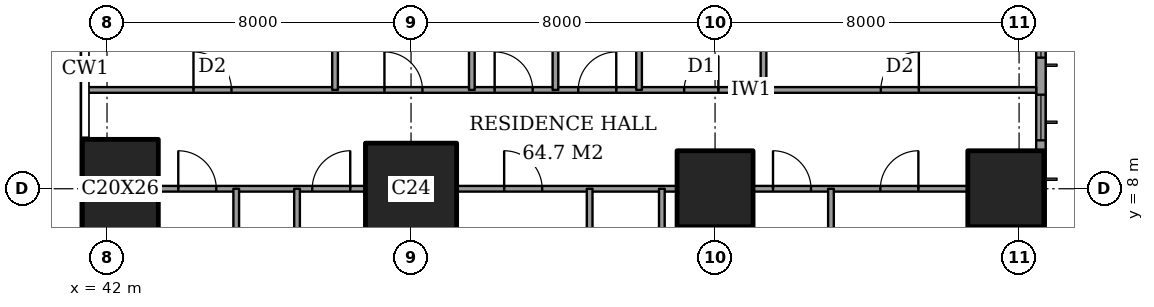
"""IFC4 building model, lengths in metres.
Left out: names, types, materials, properties, quantities, classifications, styles, units other than length and angle.
Written with IfcOpenShell. Run it as: python <this file> out.ifc"""

import sys

from ifc_helpers import new_model, si_unit, direction, frame, frame_2d, origin, origin_2d, place, context, subcontext, project, spatial, rectangle, extrude, element, fill, save


model = new_model("IFC4")
c1 = context("Model", 3, precision=1e-05, world=origin(), true_north=direction((0.0, 1.0)))
c2 = subcontext(c1, "Body", "Model", "MODEL_VIEW")
j1 = project(units=[si_unit("LENGTHUNIT", "METRE"), si_unit("PLANEANGLEUNIT", "RADIAN")], contexts=[c1])
p1 = place(None, origin())
s1 = spatial("IfcSite", under=j1, at=p1, CompositionType="ELEMENT")
p2 = place(p1, origin())
s2 = spatial("IfcBuilding", under=s1, at=p2, CompositionType="ELEMENT")
p3 = place(p2, frame((0.0, 0.0, 87.2)))
s3 = spatial("IfcBuildingStorey", under=s2, at=p3, CompositionType="ELEMENT", Elevation=87.2)
p4 = place(p3, frame((42.35, 8.0, 0.0), z_axis=(0.0, 0.0, 1.0), x_axis=(1.0, 0.0, 0.0)))
e1 = element("IfcColumn", 1, at=p4, inside=s3, PredefinedType="COLUMN", context=c2, shape_type="SweptSolid", body=[
    extrude(rectangle(XDim=2.0, YDim=2.6, at=origin_2d()), origin(), (0.0, 0.0, 1.0), 3.6),
])
p5 = place(p3, frame((50.0, 8.0, 0.0), z_axis=(0.0, 0.0, 1.0), x_axis=(1.0, 0.0, 0.0)))
e2 = element("IfcColumn", 2, at=p5, inside=s3, PredefinedType="COLUMN", context=c2, shape_type="SweptSolid", body=[
    extrude(rectangle(XDim=2.4, YDim=2.4, at=origin_2d()), origin(), (0.0, 0.0, 1.0), 3.6),
])
for number, where, z_axis, x_axis in (
    (3, (58.0, 8.0, 0.0), (0.0, 0.0, 1.0), (1.0, 0.0, 0.0)),
    (4, (65.65, 8.0, 0.0), (0.0, 0.0, 1.0), (1.0, 0.0, 0.0)),
):
    element("IfcColumn", number, at=place(p3, frame(where, z_axis=z_axis, x_axis=x_axis)), inside=s3, PredefinedType="COLUMN", context=c2, shape_type="SweptSolid", body=[
        extrude(rectangle(XDim=2.0, YDim=2.0, at=origin_2d()), origin(), (0.0, 0.0, 1.0), 3.6),
    ])
p6 = place(p3, frame((66.575, 3.175, 0.0), z_axis=(0.0, 0.0, 1.0), x_axis=(0.0, 1.0, 0.0)))
e5 = element("IfcWall", 5, at=p6, inside=s3, PredefinedType="SOLIDWALL", context=c2, shape_type="SweptSolid", body=[
    extrude(rectangle(XDim=41.65, YDim=0.25, at=frame_2d((20.825, 0.0))), origin(), (0.0, 0.0, 1.0), 3.6),
])
p7 = place(p6, frame((0.775, 0.0, 0.6)))
e6 = element("IfcOpeningElement", 6, at=p7, cuts=e5, PredefinedType="OPENING", context=c2, shape_type="SweptSolid", body=[
    extrude(rectangle(XDim=2.4, YDim=2.0, at=frame_2d((1.2, 1.0))), frame((0.0, 0.135, 0.0), z_axis=(0.0, -1.0, 0.0), x_axis=(1.0, 0.0, 0.0)), (0.0, 0.0, 1.0), 0.27),
])
p8 = place(p6, frame((6.1, 0.0, 0.6)))
e7 = element("IfcOpeningElement", 7, at=p8, cuts=e5, PredefinedType="OPENING", context=c2, shape_type="SweptSolid", body=[
    extrude(rectangle(XDim=1.2, YDim=2.0, at=frame_2d((0.6, 1.0))), frame((0.0, 0.135, 0.0), z_axis=(0.0, -1.0, 0.0), x_axis=(1.0, 0.0, 0.0)), (0.0, 0.0, 1.0), 0.27),
])
p9 = place(p6, frame((8.275, 0.0, 0.6)))
e8 = element("IfcOpeningElement", 8, at=p9, cuts=e5, PredefinedType="OPENING", context=c2, shape_type="SweptSolid", body=[
    extrude(rectangle(XDim=2.4, YDim=2.0, at=frame_2d((1.2, 1.0))), frame((0.0, 0.135, 0.0), z_axis=(0.0, -1.0, 0.0), x_axis=(1.0, 0.0, 0.0)), (0.0, 0.0, 1.0), 0.27),
])
p10 = place(p6, frame((15.775, 0.0, 0.6)))
e9 = element("IfcOpeningElement", 9, at=p10, cuts=e5, PredefinedType="OPENING", context=c2, shape_type="SweptSolid", body=[
    extrude(rectangle(XDim=2.4, YDim=2.0, at=frame_2d((1.2, 1.0))), frame((0.0, 0.135, 0.0), z_axis=(0.0, -1.0, 0.0), x_axis=(1.0, 0.0, 0.0)), (0.0, 0.0, 1.0), 0.27),
])
p11 = place(p6, frame((23.475, 0.0, 0.6)))
e10 = element("IfcOpeningElement", 10, at=p11, cuts=e5, PredefinedType="OPENING", context=c2, shape_type="SweptSolid", body=[
    extrude(rectangle(XDim=2.4, YDim=2.0, at=frame_2d((1.2, 1.0))), frame((0.0, 0.135, 0.0), z_axis=(0.0, -1.0, 0.0), x_axis=(1.0, 0.0, 0.0)), (0.0, 0.0, 1.0), 0.27),
])
p12 = place(p6, frame((30.975, 0.0, 0.6)))
e11 = element("IfcOpeningElement", 11, at=p12, cuts=e5, PredefinedType="OPENING", context=c2, shape_type="SweptSolid", body=[
    extrude(rectangle(XDim=2.4, YDim=2.0, at=frame_2d((1.2, 1.0))), frame((0.0, 0.135, 0.0), z_axis=(0.0, -1.0, 0.0), x_axis=(1.0, 0.0, 0.0)), (0.0, 0.0, 1.0), 0.27),
])
p13 = place(p6, frame((34.5, 0.0, 0.6)))
e12 = element("IfcOpeningElement", 12, at=p13, cuts=e5, PredefinedType="OPENING", context=c2, shape_type="SweptSolid", body=[
    extrude(rectangle(XDim=1.2, YDim=2.0, at=frame_2d((0.6, 1.0))), frame((0.0, 0.135, 0.0), z_axis=(0.0, -1.0, 0.0), x_axis=(1.0, 0.0, 0.0)), (0.0, 0.0, 1.0), 0.27),
])
p14 = place(p6, frame((38.475, 0.0, 0.6)))
e13 = element("IfcOpeningElement", 13, at=p14, cuts=e5, PredefinedType="OPENING", context=c2, shape_type="SweptSolid", body=[
    extrude(rectangle(XDim=2.4, YDim=2.0, at=frame_2d((1.2, 1.0))), frame((0.0, 0.135, 0.0), z_axis=(0.0, -1.0, 0.0), x_axis=(1.0, 0.0, 0.0)), (0.0, 0.0, 1.0), 0.27),
])
p15 = place(p3, frame((43.35, 8.0, 0.0), z_axis=(0.0, 0.0, 1.0), x_axis=(1.0, 0.0, 0.0)))
e14 = element("IfcWall", 14, at=p15, inside=s3, PredefinedType="PARTITIONING", context=c2, shape_type="SweptSolid", body=[
    extrude(rectangle(XDim=5.45, YDim=0.15, at=frame_2d((2.725, 0.0))), origin(), (0.0, 0.0, 1.0), 3.25),
])
p16 = place(p15, frame((4.05, 0.0, 0.0)))
e15 = element("IfcOpeningElement", 15, at=p16, cuts=e14, PredefinedType="OPENING", context=c2, shape_type="SweptSolid", body=[
    extrude(rectangle(XDim=1.0, YDim=2.1, at=frame_2d((0.5, 1.05))), frame((0.0, 0.085, 0.0), z_axis=(0.0, -1.0, 0.0), x_axis=(1.0, 0.0, 0.0)), (0.0, 0.0, 1.0), 0.17),
])
p17 = place(p15, frame((0.525, 0.0, 0.0)))
e16 = element("IfcOpeningElement", 16, at=p17, cuts=e14, PredefinedType="OPENING", context=c2, shape_type="SweptSolid", body=[
    extrude(rectangle(XDim=1.0, YDim=2.1, at=frame_2d((0.5, 1.05))), frame((0.0, 0.085, 0.0), z_axis=(0.0, -1.0, 0.0), x_axis=(1.0, 0.0, 0.0)), (0.0, 0.0, 1.0), 0.17),
])
p18 = place(p3, frame((51.2, 8.0, 0.0), z_axis=(0.0, 0.0, 1.0), x_axis=(1.0, 0.0, 0.0)))
e17 = element("IfcWall", 17, at=p18, inside=s3, PredefinedType="PARTITIONING", context=c2, shape_type="SweptSolid", body=[
    extrude(rectangle(XDim=5.8, YDim=0.15, at=frame_2d((2.9, 0.0))), origin(), (0.0, 0.0, 1.0), 3.25),
])
p19 = place(p18, frame((1.25, 0.0, 0.0)))
e18 = element("IfcOpeningElement", 18, at=p19, cuts=e17, PredefinedType="OPENING", context=c2, shape_type="SweptSolid", body=[
    extrude(rectangle(XDim=1.0, YDim=2.1, at=frame_2d((0.5, 1.05))), frame((0.0, 0.085, 0.0), z_axis=(0.0, -1.0, 0.0), x_axis=(1.0, 0.0, 0.0)), (0.0, 0.0, 1.0), 0.17),
])
p20 = place(p3, frame((59.0, 8.0, 0.0), z_axis=(0.0, 0.0, 1.0), x_axis=(1.0, 0.0, 0.0)))
e19 = element("IfcWall", 19, at=p20, inside=s3, PredefinedType="PARTITIONING", context=c2, shape_type="SweptSolid", body=[
    extrude(rectangle(XDim=5.65, YDim=0.15, at=frame_2d((2.825, 0.0))), origin(), (0.0, 0.0, 1.0), 3.25),
])
p21 = place(p20, frame((3.35, 0.0, 0.0)))
e20 = element("IfcOpeningElement", 20, at=p21, cuts=e19, PredefinedType="OPENING", context=c2, shape_type="SweptSolid", body=[
    extrude(rectangle(XDim=1.0, YDim=2.1, at=frame_2d((0.5, 1.05))), frame((0.0, 0.085, 0.0), z_axis=(0.0, -1.0, 0.0), x_axis=(1.0, 0.0, 0.0)), (0.0, 0.0, 1.0), 0.17),
])
p22 = place(p20, frame((0.525, 0.0, 0.0)))
e21 = element("IfcOpeningElement", 21, at=p22, cuts=e19, PredefinedType="OPENING", context=c2, shape_type="SweptSolid", body=[
    extrude(rectangle(XDim=1.0, YDim=2.1, at=frame_2d((0.5, 1.05))), frame((0.0, 0.085, 0.0), z_axis=(0.0, -1.0, 0.0), x_axis=(1.0, 0.0, 0.0)), (0.0, 0.0, 1.0), 0.17),
])
p23 = place(p3, frame((41.439, 10.6, 0.0), z_axis=(0.0, 0.0, 1.0), x_axis=(1.0, 0.0, 0.0)))
e22 = element("IfcWall", 22, at=p23, inside=s3, PredefinedType="PARTITIONING", context=c2, shape_type="SweptSolid", body=[
    extrude(rectangle(XDim=25.011, YDim=0.15, at=frame_2d((12.505, 0.0))), origin(), (0.0, 0.0, 1.0), 3.25),
])
p24 = place(p23, frame((10.761, 0.0, 0.0)))
e23 = element("IfcOpeningElement", 23, at=p24, cuts=e22, PredefinedType="OPENING", context=c2, shape_type="SweptSolid", body=[
    extrude(rectangle(XDim=1.0, YDim=2.1, at=frame_2d((0.5, 1.05))), frame((0.0, 0.085, 0.0), z_axis=(0.0, -1.0, 0.0), x_axis=(1.0, 0.0, 0.0)), (0.0, 0.0, 1.0), 0.17),
])
p25 = place(p23, frame((20.924, 0.0, 0.0)))
e24 = element("IfcOpeningElement", 24, at=p25, cuts=e22, PredefinedType="OPENING", context=c2, shape_type="SweptSolid", body=[
    extrude(rectangle(XDim=1.0, YDim=2.1, at=frame_2d((0.5, 1.05))), frame((0.0, 0.085, 0.0), z_axis=(0.0, -1.0, 0.0), x_axis=(1.0, 0.0, 0.0)), (0.0, 0.0, 1.0), 0.17),
])
p26 = place(p23, frame((15.749, 0.0, 0.0)))
e25 = element("IfcOpeningElement", 25, at=p26, cuts=e22, PredefinedType="OPENING", context=c2, shape_type="SweptSolid", body=[
    extrude(rectangle(XDim=0.9, YDim=2.1, at=frame_2d((0.45, 1.05))), frame((0.0, 0.085, 0.0), z_axis=(0.0, -1.0, 0.0), x_axis=(1.0, 0.0, 0.0)), (0.0, 0.0, 1.0), 0.17),
])
p27 = place(p23, frame((12.961, 0.0, 0.0)))
e26 = element("IfcOpeningElement", 26, at=p27, cuts=e22, PredefinedType="OPENING", context=c2, shape_type="SweptSolid", body=[
    extrude(rectangle(XDim=1.0, YDim=2.1, at=frame_2d((0.5, 1.05))), frame((0.0, 0.085, 0.0), z_axis=(0.0, -1.0, 0.0), x_axis=(1.0, 0.0, 0.0)), (0.0, 0.0, 1.0), 0.17),
])
p28 = place(p23, frame((7.861, 0.0, 0.0)))
e27 = element("IfcOpeningElement", 27, at=p28, cuts=e22, PredefinedType="OPENING", context=c2, shape_type="SweptSolid", body=[
    extrude(rectangle(XDim=1.0, YDim=2.1, at=frame_2d((0.5, 1.05))), frame((0.0, 0.085, 0.0), z_axis=(0.0, -1.0, 0.0), x_axis=(1.0, 0.0, 0.0)), (0.0, 0.0, 1.0), 0.17),
])
p29 = place(p23, frame((2.836, 0.0, 0.0)))
e28 = element("IfcOpeningElement", 28, at=p29, cuts=e22, PredefinedType="OPENING", context=c2, shape_type="SweptSolid", body=[
    extrude(rectangle(XDim=1.0, YDim=2.1, at=frame_2d((0.5, 1.05))), frame((0.0, 0.085, 0.0), z_axis=(0.0, -1.0, 0.0), x_axis=(1.0, 0.0, 0.0)), (0.0, 0.0, 1.0), 0.17),
])
p30 = place(p3, frame((45.4, -0.45, 0.0), z_axis=(0.0, 0.0, 1.0), x_axis=(0.0, 1.0, 0.0)))
e29 = element("IfcWall", 29, at=p30, inside=s3, PredefinedType="PARTITIONING", context=c2, shape_type="SweptSolid", body=[
    extrude(rectangle(XDim=8.45, YDim=0.15, at=frame_2d((4.225, 0.0))), origin(), (0.0, 0.0, 1.0), 3.25),
])
p31 = place(p30, frame((3.775, 0.0, 0.0)))
e30 = element("IfcOpeningElement", 30, at=p31, cuts=e29, PredefinedType="OPENING", context=c2, shape_type="SweptSolid", body=[
    extrude(rectangle(XDim=0.9, YDim=2.1, at=frame_2d((0.45, 1.05))), frame((0.0, 0.085, 0.0), z_axis=(0.0, -1.0, 0.0), x_axis=(1.0, 0.0, 0.0)), (0.0, 0.0, 1.0), 0.17),
])
p32 = place(p3, frame((47.0, -0.45, 0.0), z_axis=(0.0, 0.0, 1.0), x_axis=(0.0, 1.0, 0.0)))
e31 = element("IfcWall", 31, at=p32, inside=s3, PredefinedType="PARTITIONING", context=c2, shape_type="SweptSolid", body=[
    extrude(rectangle(XDim=8.45, YDim=0.15, at=frame_2d((4.225, 0.0))), origin(), (0.0, 0.0, 1.0), 3.25),
])
for number, where, z_axis, x_axis in (
    (32, (48.0, 10.6, 0.0), (0.0, 0.0, 1.0), (0.0, 1.0, 0.0)),
    (33, (51.6, 10.6, 0.0), (0.0, 0.0, 1.0), (0.0, 1.0, 0.0)),
    (34, (53.8, 10.6, 0.0), (0.0, 0.0, 1.0), (0.0, 1.0, 0.0)),
):
    element("IfcWall", number, at=place(p3, frame(where, z_axis=z_axis, x_axis=x_axis)), inside=s3, PredefinedType="PARTITIONING", context=c2, shape_type="SweptSolid", body=[
        extrude(rectangle(XDim=6.4, YDim=0.15, at=frame_2d((3.2, 0.0))), origin(), (0.0, 0.0, 1.0), 3.25),
    ])
p33 = place(p3, frame((54.7, -0.45, 0.0), z_axis=(0.0, 0.0, 1.0), x_axis=(0.0, 1.0, 0.0)))
e35 = element("IfcWall", 35, at=p33, inside=s3, PredefinedType="PARTITIONING", context=c2, shape_type="SweptSolid", body=[
    extrude(rectangle(XDim=8.45, YDim=0.15, at=frame_2d((4.225, 0.0))), origin(), (0.0, 0.0, 1.0), 3.25),
])
p34 = place(p33, frame((3.775, 0.0, 0.0)))
e36 = element("IfcOpeningElement", 36, at=p34, cuts=e35, PredefinedType="OPENING", context=c2, shape_type="SweptSolid", body=[
    extrude(rectangle(XDim=0.9, YDim=2.1, at=frame_2d((0.45, 1.05))), frame((0.0, 0.085, 0.0), z_axis=(0.0, -1.0, 0.0), x_axis=(1.0, 0.0, 0.0)), (0.0, 0.0, 1.0), 0.17),
])
p35 = place(p3, frame((56.0, 10.6, 0.0), z_axis=(0.0, 0.0, 1.0), x_axis=(0.0, 1.0, 0.0)))
e37 = element("IfcWall", 37, at=p35, inside=s3, PredefinedType="PARTITIONING", context=c2, shape_type="SweptSolid", body=[
    extrude(rectangle(XDim=11.0, YDim=0.15, at=frame_2d((5.5, 0.0))), origin(), (0.0, 0.0, 1.0), 3.25),
])
p36 = place(p35, frame((8.2, 0.0, 0.0)))
e38 = element("IfcOpeningElement", 38, at=p36, cuts=e37, PredefinedType="OPENING", context=c2, shape_type="SweptSolid", body=[
    extrude(rectangle(XDim=1.0, YDim=2.1, at=frame_2d((0.5, 1.05))), frame((0.0, 0.085, 0.0), z_axis=(0.0, -1.0, 0.0), x_axis=(1.0, 0.0, 0.0)), (0.0, 0.0, 1.0), 0.17),
])
p37 = place(p3, frame((56.6, -0.45, 0.0), z_axis=(0.0, 0.0, 1.0), x_axis=(0.0, 1.0, 0.0)))
e39 = element("IfcWall", 39, at=p37, inside=s3, PredefinedType="PARTITIONING", context=c2, shape_type="SweptSolid", body=[
    extrude(rectangle(XDim=8.45, YDim=0.15, at=frame_2d((4.225, 0.0))), origin(), (0.0, 0.0, 1.0), 3.25),
])
p38 = place(p3, frame((59.275, 10.6, 0.0), z_axis=(0.0, 0.0, 1.0), x_axis=(0.0, 1.0, 0.0)))
e40 = element("IfcWall", 40, at=p38, inside=s3, PredefinedType="PARTITIONING", context=c2, shape_type="SweptSolid", body=[
    extrude(rectangle(XDim=4.2, YDim=0.15, at=frame_2d((2.1, 0.0))), origin(), (0.0, 0.0, 1.0), 3.25),
])
p39 = place(p3, frame((61.05, -0.45, 0.0), z_axis=(0.0, 0.0, 1.0), x_axis=(0.0, 1.0, 0.0)))
e41 = element("IfcWall", 41, at=p39, inside=s3, PredefinedType="PARTITIONING", context=c2, shape_type="SweptSolid", body=[
    extrude(rectangle(XDim=8.45, YDim=0.15, at=frame_2d((4.225, 0.0))), origin(), (0.0, 0.0, 1.0), 3.25),
])
p40 = place(p8, origin())
e42 = element("IfcWindow", 42, at=p40, inside=s3, PartitioningType="SINGLE_PANEL", PredefinedType="WINDOW", context=c2, shape_type="SweptSolid", body=[
    extrude(rectangle(XDim=1.2, YDim=2.0, at=frame_2d((0.6, 1.0))), frame((0.0, 0.03, 0.0), z_axis=(0.0, -1.0, 0.0), x_axis=(1.0, 0.0, 0.0)), (0.0, 0.0, 1.0), 0.06),
])
fill(e7, e42)
p41 = place(p9, origin())
e43 = element("IfcWindow", 43, at=p41, inside=s3, PartitioningType="SINGLE_PANEL", PredefinedType="WINDOW", context=c2, shape_type="SweptSolid", body=[
    extrude(rectangle(XDim=2.4, YDim=2.0, at=frame_2d((1.2, 1.0))), frame((0.0, 0.03, 0.0), z_axis=(0.0, -1.0, 0.0), x_axis=(1.0, 0.0, 0.0)), (0.0, 0.0, 1.0), 0.06),
])
fill(e8, e43)
p42 = place(p21, origin())
e44 = element("IfcDoor", 44, at=p42, inside=s3, OperationType="SINGLE_SWING_LEFT", PredefinedType="DOOR", context=c2, shape_type="SweptSolid", body=[
    extrude(rectangle(XDim=1.0, YDim=2.1, at=frame_2d((0.5, 1.05))), frame((0.0, 0.025, 0.0), z_axis=(0.0, -1.0, 0.0), x_axis=(1.0, 0.0, 0.0)), (0.0, 0.0, 1.0), 0.05),
])
fill(e20, e44)
p43 = place(p22, origin())
e45 = element("IfcDoor", 45, at=p43, inside=s3, OperationType="SINGLE_SWING_RIGHT", PredefinedType="DOOR", context=c2, shape_type="SweptSolid", body=[
    extrude(rectangle(XDim=1.0, YDim=2.1, at=frame_2d((0.5, 1.05))), frame((0.0, 0.025, 0.0), z_axis=(0.0, -1.0, 0.0), x_axis=(1.0, 0.0, 0.0)), (0.0, 0.0, 1.0), 0.05),
])
fill(e21, e45)
p44 = place(p19, origin())
e46 = element("IfcDoor", 46, at=p44, inside=s3, OperationType="SINGLE_SWING_RIGHT", PredefinedType="DOOR", context=c2, shape_type="SweptSolid", body=[
    extrude(rectangle(XDim=1.0, YDim=2.1, at=frame_2d((0.5, 1.05))), frame((0.0, 0.025, 0.0), z_axis=(0.0, -1.0, 0.0), x_axis=(1.0, 0.0, 0.0)), (0.0, 0.0, 1.0), 0.05),
])
fill(e18, e46)
p45 = place(p16, origin())
e47 = element("IfcDoor", 47, at=p45, inside=s3, OperationType="SINGLE_SWING_LEFT", PredefinedType="DOOR", context=c2, shape_type="SweptSolid", body=[
    extrude(rectangle(XDim=1.0, YDim=2.1, at=frame_2d((0.5, 1.05))), frame((0.0, 0.025, 0.0), z_axis=(0.0, -1.0, 0.0), x_axis=(1.0, 0.0, 0.0)), (0.0, 0.0, 1.0), 0.05),
])
fill(e15, e47)
p46 = place(p17, origin())
e48 = element("IfcDoor", 48, at=p46, inside=s3, OperationType="SINGLE_SWING_RIGHT", PredefinedType="DOOR", context=c2, shape_type="SweptSolid", body=[
    extrude(rectangle(XDim=1.0, YDim=2.1, at=frame_2d((0.5, 1.05))), frame((0.0, 0.025, 0.0), z_axis=(0.0, -1.0, 0.0), x_axis=(1.0, 0.0, 0.0)), (0.0, 0.0, 1.0), 0.05),
])
fill(e16, e48)
p47 = place(p24, origin())
e49 = element("IfcDoor", 49, at=p47, inside=s3, OperationType="SINGLE_SWING_RIGHT", PredefinedType="DOOR", context=c2, shape_type="SweptSolid", body=[
    extrude(rectangle(XDim=1.0, YDim=2.1, at=frame_2d((0.5, 1.05))), frame((0.0, 0.025, 0.0), z_axis=(0.0, -1.0, 0.0), x_axis=(1.0, 0.0, 0.0)), (0.0, 0.0, 1.0), 0.05),
])
fill(e23, e49)
p48 = place(p25, origin())
e50 = element("IfcDoor", 50, at=p48, inside=s3, OperationType="SINGLE_SWING_LEFT", PredefinedType="DOOR", context=c2, shape_type="SweptSolid", body=[
    extrude(rectangle(XDim=1.0, YDim=2.1, at=frame_2d((0.5, 1.05))), frame((0.0, 0.025, 0.0), z_axis=(0.0, -1.0, 0.0), x_axis=(1.0, 0.0, 0.0)), (0.0, 0.0, 1.0), 0.05),
])
fill(e24, e50)
p49 = place(p26, origin())
e51 = element("IfcDoor", 51, at=p49, inside=s3, OperationType="SINGLE_SWING_LEFT", PredefinedType="DOOR", context=c2, shape_type="SweptSolid", body=[
    extrude(rectangle(XDim=0.9, YDim=2.1, at=frame_2d((0.45, 1.05))), frame((0.0, 0.025, 0.0), z_axis=(0.0, -1.0, 0.0), x_axis=(1.0, 0.0, 0.0)), (0.0, 0.0, 1.0), 0.05),
])
fill(e25, e51)
p50 = place(p27, origin())
e52 = element("IfcDoor", 52, at=p50, inside=s3, OperationType="SINGLE_SWING_LEFT", PredefinedType="DOOR", context=c2, shape_type="SweptSolid", body=[
    extrude(rectangle(XDim=1.0, YDim=2.1, at=frame_2d((0.5, 1.05))), frame((0.0, 0.025, 0.0), z_axis=(0.0, -1.0, 0.0), x_axis=(1.0, 0.0, 0.0)), (0.0, 0.0, 1.0), 0.05),
])
fill(e26, e52)
p51 = place(p28, origin())
e53 = element("IfcDoor", 53, at=p51, inside=s3, OperationType="SINGLE_SWING_RIGHT", PredefinedType="DOOR", context=c2, shape_type="SweptSolid", body=[
    extrude(rectangle(XDim=1.0, YDim=2.1, at=frame_2d((0.5, 1.05))), frame((0.0, 0.025, 0.0), z_axis=(0.0, -1.0, 0.0), x_axis=(1.0, 0.0, 0.0)), (0.0, 0.0, 1.0), 0.05),
])
fill(e27, e53)
p52 = place(p29, origin())
e54 = element("IfcDoor", 54, at=p52, inside=s3, OperationType="SINGLE_SWING_RIGHT", PredefinedType="DOOR", context=c2, shape_type="SweptSolid", body=[
    extrude(rectangle(XDim=1.0, YDim=2.1, at=frame_2d((0.5, 1.05))), frame((0.0, 0.025, 0.0), z_axis=(0.0, -1.0, 0.0), x_axis=(1.0, 0.0, 0.0)), (0.0, 0.0, 1.0), 0.05),
])
fill(e28, e54)
save(model, sys.argv[1])
